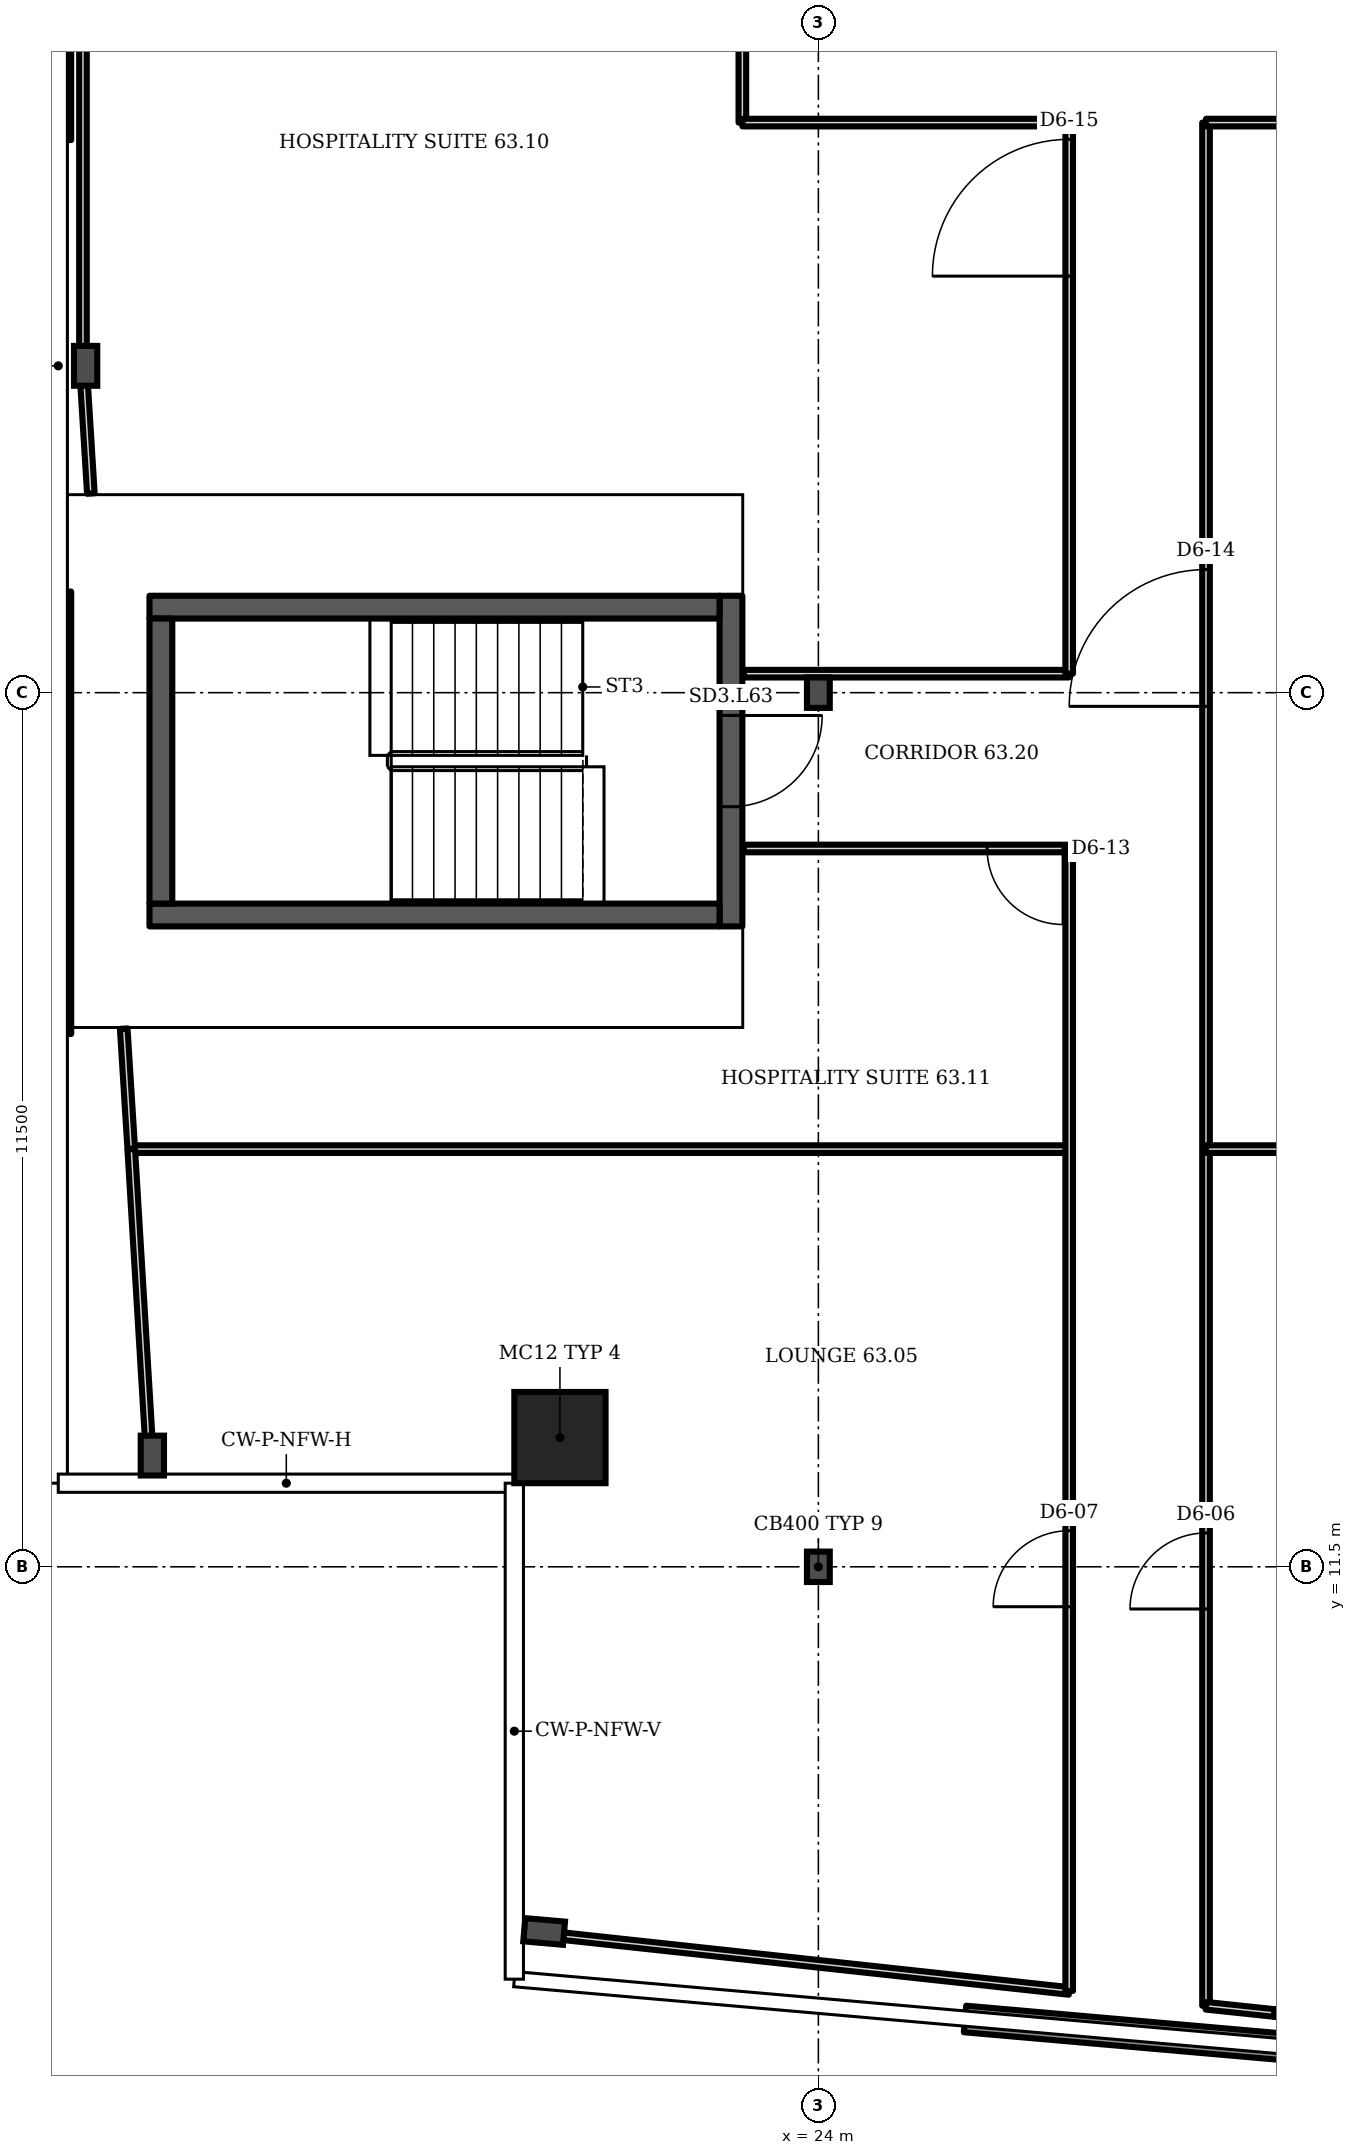
"""IFC4 building model, lengths in metres.
Left out: names, types, materials, properties, quantities, classifications, styles, units other than length and angle.
Written with IfcOpenShell. Run it as: python <this file> out.ifc"""

import sys

from ifc_helpers import new_model, si_unit, direction, frame, frame_2d, origin, origin_2d, place, context, subcontext, project, spatial, rectangle, i_section, extrude, element, fill, save


model = new_model("IFC4")
c1 = context("Model", 3, precision=1e-05, world=origin(), true_north=direction((0.0, 1.0)))
c2 = subcontext(c1, "Body", "Model", "MODEL_VIEW")
j1 = project(units=[si_unit("LENGTHUNIT", "METRE"), si_unit("PLANEANGLEUNIT", "RADIAN")], contexts=[c1])
p1 = place(None, origin())
s1 = spatial("IfcSite", under=j1, at=p1, CompositionType="ELEMENT")
p2 = place(p1, origin())
s2 = spatial("IfcBuilding", under=s1, at=p2, CompositionType="ELEMENT")
p3 = place(p2, frame((0.0, 0.0, 250.3)))
s3 = spatial("IfcBuildingStorey", under=s2, at=p3, CompositionType="ELEMENT", Elevation=250.3)
p4 = place(p3, frame((20.6, 13.2, 0.0), z_axis=(0.0, 0.0, 1.0), x_axis=(1.0, 0.0, 0.0)))
e1 = element("IfcColumn", 1, at=p4, inside=s3, PredefinedType="COLUMN", context=c2, shape_type="SweptSolid", body=[
    extrude(rectangle(XDim=1.2, YDim=1.2, at=origin_2d()), origin(), (0.0, 0.0, 1.0), 3.6),
])
for number, where, z_axis, x_axis in (
    (2, (20.392, 6.703, 0.0), (0.0, 0.0, 1.0), (-0.087, -0.996, 0.0)),
    (3, (14.36, 27.3, 0.0), (0.0, 0.0, 1.0), (-1.0, 0.0, 0.0)),
    (4, (15.238, 12.963, 0.0), (0.0, 0.0, 1.0), (-1.0, 0.0, 0.0)),
):
    element("IfcColumn", number, at=place(p3, frame(where, z_axis=z_axis, x_axis=x_axis)), inside=s3, PredefinedType="COLUMN", context=c2, shape_type="SweptSolid", body=[
        extrude(i_section(OverallWidth=0.306, OverallDepth=0.524, WebThickness=0.021, FlangeThickness=0.04, FilletRadius=0.027, at=origin_2d()), origin(), (0.0, 0.0, 1.0), 3.6),
    ])
for number, where, z_axis, x_axis in (
    (5, (24.0, 11.5, 0.0), (0.0, 0.0, 1.0), (1.0, 0.0, 0.0)),
    (6, (24.0, 23.0, 0.0), (0.0, 0.0, 1.0), (1.0, 0.0, 0.0)),
):
    element("IfcColumn", number, at=place(p3, frame(where, z_axis=z_axis, x_axis=x_axis)), inside=s3, PredefinedType="COLUMN", context=c2, shape_type="SweptSolid", body=[
        extrude(i_section(OverallWidth=0.3, OverallDepth=0.4, WebThickness=0.013, FlangeThickness=0.024, FilletRadius=0.027, at=origin_2d()), origin(), (0.0, 0.0, 1.0), 3.6),
    ])
p5 = place(p3, frame((25.929, 5.551, 0.0), z_axis=(0.0, 0.0, 1.0), x_axis=(0.996198, -0.08716, 0.0)))
e7 = element("IfcWall", 7, at=p5, inside=s3, PredefinedType="SOLIDWALL", context=c2, shape_type="SweptSolid", body=[
    extrude(rectangle(XDim=5.863, YDim=0.35, at=frame_2d((2.931, 0.0))), origin(), (0.0, 0.0, 1.0), 1.0),
])
for number, where, z_axis, x_axis in (
    (8, (13.995, 36.09, 0.0), (0.0, 0.0, 1.0), (0.0, -1.0, 0.0)),
    (9, (13.995, 24.33, 0.0), (0.0, 0.0, 1.0), (0.0, -1.0, 0.0)),
):
    element("IfcWall", number, at=place(p3, frame(where, z_axis=z_axis, x_axis=x_axis)), inside=s3, PredefinedType="SOLIDWALL", context=c2, shape_type="SweptSolid", body=[
        extrude(rectangle(XDim=5.82, YDim=0.35, at=frame_2d((2.91, 0.0))), origin(), (0.0, 0.0, 1.0), 1.0),
    ])
p6 = place(p3, frame((22.85, 19.925, 0.0), z_axis=(0.0, 0.0, 1.0), x_axis=(0.0, 1.0, 0.0)))
e10 = element("IfcWall", 10, at=p6, inside=s3, PredefinedType="SHEAR", context=c2, shape_type="SweptSolid", body=[
    extrude(rectangle(XDim=4.35, YDim=0.3, at=frame_2d((2.175, 0.0))), origin(), (0.0, 0.0, 1.0), 3.2),
])
p7 = place(p6, frame((1.575, 0.0, 0.0)))
e11 = element("IfcOpeningElement", 11, at=p7, cuts=e10, PredefinedType="OPENING", context=c2, shape_type="SweptSolid", body=[
    extrude(rectangle(XDim=1.2, YDim=2.1, at=frame_2d((0.6, 1.05))), frame((0.0, 0.16, 0.0), z_axis=(0.0, -1.0, 0.0), x_axis=(1.0, 0.0, 0.0)), (0.0, 0.0, 1.0), 0.32),
])
p8 = place(p3, frame((14.325, 27.3, 0.0), z_axis=(0.0, 0.0, 1.0), x_axis=(0.0, 1.0, 0.0)))
e12 = element("IfcWall", 12, at=p8, inside=s3, PredefinedType="PARTITIONING", context=c2, shape_type="SweptSolid", body=[
    extrude(rectangle(XDim=14.68, YDim=0.1, at=frame_2d((7.34, 0.0))), origin(), (0.0, 0.0, 1.0), 2.58),
])
p9 = place(p3, frame((14.429, 25.62, 0.0), z_axis=(0.0, 0.0, 1.0), x_axis=(-0.061647, 0.998101, 0.0)))
e13 = element("IfcWall", 13, at=p9, inside=s3, PredefinedType="PARTITIONING", context=c2, shape_type="SweptSolid", body=[
    extrude(rectangle(XDim=1.683, YDim=0.1, at=frame_2d((0.842, 0.0))), origin(), (0.0, 0.0, 1.0), 3.2),
])
p10 = place(p3, frame((14.96, 16.995, 0.0), z_axis=(0.0, 0.0, 1.0), x_axis=(1.0, 0.0, 0.0)))
e14 = element("IfcWall", 14, at=p10, inside=s3, PredefinedType="PARTITIONING", context=c2, shape_type="SweptSolid", body=[
    extrude(rectangle(XDim=12.34, YDim=0.1, at=frame_2d((6.17, 0.0))), origin(), (0.0, 0.0, 1.0), 3.2),
])
p11 = place(p3, frame((14.96, 17.0, 0.0), z_axis=(0.0, 0.0, 1.0), x_axis=(-0.062301, 0.998053, 0.0)))
e15 = element("IfcWall", 15, at=p11, inside=s3, PredefinedType="PARTITIONING", context=c2, shape_type="SweptSolid", body=[
    extrude(rectangle(XDim=1.583, YDim=0.1, at=frame_2d((0.792, 0.0))), origin(), (0.0, 0.0, 1.0), 3.2),
])
p12 = place(p3, frame((15.224, 12.62, 0.0), z_axis=(0.0, 0.0, 1.0), x_axis=(-0.060214, 0.998182, 0.0)))
e16 = element("IfcWall", 16, at=p12, inside=s3, PredefinedType="PARTITIONING", context=c2, shape_type="SweptSolid", body=[
    extrude(rectangle(XDim=4.383, YDim=0.1, at=frame_2d((2.191, 0.0))), origin(), (0.0, 0.0, 1.0), 3.2),
])
p13 = place(p3, frame((23.0, 30.5, 0.0), z_axis=(0.0, 0.0, 1.0), x_axis=(0.0, 1.0, 0.0)))
e17 = element("IfcWall", 17, at=p13, inside=s3, PredefinedType="PARTITIONING", context=c2, shape_type="SweptSolid", body=[
    extrude(rectangle(XDim=3.48, YDim=0.1, at=frame_2d((1.74, 0.0))), origin(), (0.0, 0.0, 1.0), 3.2),
])
p14 = place(p3, frame((23.0, 30.5, 0.0), z_axis=(0.0, 0.0, 1.0), x_axis=(1.0, 0.0, 0.0)))
e18 = element("IfcWall", 18, at=p14, inside=s3, PredefinedType="PARTITIONING", context=c2, shape_type="SweptSolid", body=[
    extrude(rectangle(XDim=4.3, YDim=0.1, at=frame_2d((2.15, 0.0))), origin(), (0.0, 0.0, 1.0), 3.2),
])
p15 = place(p3, frame((23.02, 20.95, 0.0), z_axis=(0.0, 0.0, 1.0), x_axis=(1.0, 0.0, 0.0)))
e19 = element("IfcWall", 19, at=p15, inside=s3, PredefinedType="PARTITIONING", context=c2, shape_type="SweptSolid", body=[
    extrude(rectangle(XDim=4.28, YDim=0.1, at=frame_2d((2.14, 0.0))), origin(), (0.0, 0.0, 1.0), 3.2),
])
p16 = place(p15, frame((3.2, 0.0, 0.0)))
e20 = element("IfcOpeningElement", 20, at=p16, cuts=e19, PredefinedType="OPENING", context=c2, shape_type="SweptSolid", body=[
    extrude(rectangle(XDim=1.0, YDim=2.1, at=frame_2d((0.5, 1.05))), frame((0.0, 0.06, 0.0), z_axis=(0.0, -1.0, 0.0), x_axis=(1.0, 0.0, 0.0)), (0.0, 0.0, 1.0), 0.12),
])
p17 = place(p3, frame((23.02, 23.25, 0.0), z_axis=(0.0, 0.0, 1.0), x_axis=(1.0, 0.0, 0.0)))
e21 = element("IfcWall", 21, at=p17, inside=s3, PredefinedType="PARTITIONING", context=c2, shape_type="SweptSolid", body=[
    extrude(rectangle(XDim=4.275, YDim=0.1, at=frame_2d((2.137, 0.0))), origin(), (0.0, 0.0, 1.0), 3.2),
])
p18 = place(p3, frame((27.3, 5.92, 0.0), z_axis=(0.0, 0.0, 1.0), x_axis=(-0.994192, 0.107591, 0.0)))
e22 = element("IfcWall", 22, at=p18, inside=s3, PredefinedType="PARTITIONING", context=c2, shape_type="SweptSolid", body=[
    extrude(rectangle(XDim=7.323, YDim=0.1, at=frame_2d((3.661, 0.0))), origin(), (0.0, 0.0, 1.0), 2.58),
])
p19 = place(p3, frame((27.3, 23.25, 0.0), z_axis=(0.0, 0.0, 1.0), x_axis=(0.0, 1.0, 0.0)))
e23 = element("IfcWall", 23, at=p19, inside=s3, PredefinedType="PARTITIONING", context=c2, shape_type="SweptSolid", body=[
    extrude(rectangle(XDim=7.25, YDim=0.1, at=frame_2d((3.625, 0.0))), origin(), (0.0, 0.0, 1.0), 3.2),
])
p20 = place(p19, frame((5.23, 0.0, 0.0)))
e24 = element("IfcOpeningElement", 24, at=p20, cuts=e23, PredefinedType="OPENING", context=c2, shape_type="SweptSolid", body=[
    extrude(rectangle(XDim=1.8, YDim=2.1, at=frame_2d((0.9, 1.05))), frame((0.0, 0.06, 0.0), z_axis=(0.0, -1.0, 0.0), x_axis=(1.0, 0.0, 0.0)), (0.0, 0.0, 1.0), 0.12),
])
p21 = place(p3, frame((27.3, 5.92, 0.0), z_axis=(0.0, 0.0, 1.0), x_axis=(0.0, 1.0, 0.0)))
e25 = element("IfcWall", 25, at=p21, inside=s3, PredefinedType="PARTITIONING", context=c2, shape_type="SweptSolid", body=[
    extrude(rectangle(XDim=15.03, YDim=0.1, at=frame_2d((7.515, 0.0))), origin(), (0.0, 0.0, 1.0), 3.2),
])
p22 = place(p21, frame((5.055, 0.0, 0.0)))
e26 = element("IfcOpeningElement", 26, at=p22, cuts=e25, PredefinedType="OPENING", context=c2, shape_type="SweptSolid", body=[
    extrude(rectangle(XDim=1.0, YDim=2.1, at=frame_2d((0.5, 1.05))), frame((0.0, 0.06, 0.0), z_axis=(0.0, -1.0, 0.0), x_axis=(1.0, 0.0, 0.0)), (0.0, 0.0, 1.0), 0.12),
])
p23 = place(p3, frame((29.1, 5.725, 0.0), z_axis=(0.0, 0.0, 1.0), x_axis=(0.0, 1.0, 0.0)))
e27 = element("IfcWall", 27, at=p23, inside=s3, PredefinedType="PARTITIONING", context=c2, shape_type="SweptSolid", body=[
    extrude(rectangle(XDim=24.775, YDim=0.1, at=frame_2d((12.387, 0.0))), origin(), (0.0, 0.0, 1.0), 3.2),
])
p24 = place(p23, frame((5.22, 0.0, 0.0)))
e28 = element("IfcOpeningElement", 28, at=p24, cuts=e27, PredefinedType="OPENING", context=c2, shape_type="SweptSolid", body=[
    extrude(rectangle(XDim=1.0, YDim=2.1, at=frame_2d((0.5, 1.05))), frame((0.0, 0.06, 0.0), z_axis=(0.0, -1.0, 0.0), x_axis=(1.0, 0.0, 0.0)), (0.0, 0.0, 1.0), 0.12),
])
p25 = place(p23, frame((17.095, 0.0, 0.0)))
e29 = element("IfcOpeningElement", 29, at=p25, cuts=e27, PredefinedType="OPENING", context=c2, shape_type="SweptSolid", body=[
    extrude(rectangle(XDim=1.8, YDim=2.1, at=frame_2d((0.9, 1.05))), frame((0.0, 0.06, 0.0), z_axis=(0.0, -1.0, 0.0), x_axis=(1.0, 0.0, 0.0)), (0.0, 0.0, 1.0), 0.12),
])
p26 = place(p3, frame((29.1, 16.995, 0.0), z_axis=(0.0, 0.0, 1.0), x_axis=(1.0, 0.0, 0.0)))
e30 = element("IfcWall", 30, at=p26, inside=s3, PredefinedType="PARTITIONING", context=c2, shape_type="SweptSolid", body=[
    extrude(rectangle(XDim=11.4, YDim=0.1, at=frame_2d((5.7, 0.0))), origin(), (0.0, 0.0, 1.0), 3.2),
])
p27 = place(p3, frame((29.1, 30.5, 0.0), z_axis=(0.0, 0.0, 1.0), x_axis=(1.0, 0.0, 0.0)))
e31 = element("IfcWall", 31, at=p27, inside=s3, PredefinedType="PARTITIONING", context=c2, shape_type="SweptSolid", body=[
    extrude(rectangle(XDim=7.75, YDim=0.1, at=frame_2d((3.875, 0.0))), origin(), (0.0, 0.0, 1.0), 3.2),
])
p28 = place(p3, frame((30.0, 5.63, 0.0), z_axis=(0.0, 0.0, 1.0), x_axis=(-0.994445, 0.105218, 0.0)))
e32 = element("IfcWall", 32, at=p28, inside=s3, PredefinedType="PARTITIONING", context=c2, shape_type="SweptSolid", body=[
    extrude(rectangle(XDim=0.905, YDim=0.1, at=frame_2d((0.453, 0.0))), origin(), (0.0, 0.0, 1.0), 2.58),
])
p29 = place(p3, frame((35.275, 5.055, 0.0), z_axis=(0.0, 0.0, 1.0), x_axis=(-0.994115, 0.108356, 0.0)))
e33 = element("IfcWall", 33, at=p29, inside=s3, PredefinedType="PARTITIONING", context=c2, shape_type="SweptSolid", body=[
    extrude(rectangle(XDim=5.306, YDim=0.1, at=frame_2d((2.653, 0.0))), origin(), (0.0, 0.0, 1.0), 2.58),
])
for number, where, z_axis, x_axis in (
    (34, (15.2, 20.075, 0.0), (0.0, 0.0, 1.0), (1.0, 0.0, 0.0)),
    (35, (15.2, 24.125, 0.0), (0.0, 0.0, 1.0), (1.0, 0.0, 0.0)),
):
    element("IfcWall", number, at=place(p3, frame(where, z_axis=z_axis, x_axis=x_axis)), inside=s3, PredefinedType="SHEAR", context=c2, shape_type="SweptSolid", body=[
        extrude(rectangle(XDim=7.5, YDim=0.3, at=frame_2d((3.75, 0.0))), origin(), (0.0, 0.0, 1.0), 3.2),
    ])
p30 = place(p3, frame((15.35, 20.225, 0.0), z_axis=(0.0, 0.0, 1.0), x_axis=(0.0, 1.0, 0.0)))
e36 = element("IfcWall", 36, at=p30, inside=s3, PredefinedType="SHEAR", context=c2, shape_type="SweptSolid", body=[
    extrude(rectangle(XDim=3.75, YDim=0.3, at=frame_2d((1.875, 0.0))), origin(), (0.0, 0.0, 1.0), 3.2),
])
p31 = place(p7, origin())
e37 = element("IfcDoor", 37, at=p31, inside=s3, OperationType="SINGLE_SWING_RIGHT", PredefinedType="DOOR", context=c2, shape_type="SweptSolid", body=[
    extrude(rectangle(XDim=1.2, YDim=2.1, at=frame_2d((0.6, 1.05))), frame((0.0, 0.025, 0.0), z_axis=(0.0, -1.0, 0.0), x_axis=(1.0, 0.0, 0.0)), (0.0, 0.0, 1.0), 0.05),
])
fill(e11, e37)
p32 = place(p24, origin())
e38 = element("IfcDoor", 38, at=p32, inside=s3, OperationType="SINGLE_SWING_LEFT", PredefinedType="DOOR", context=c2, shape_type="SweptSolid", body=[
    extrude(rectangle(XDim=1.0, YDim=2.1, at=frame_2d((0.5, 1.05))), frame((0.0, 0.025, 0.0), z_axis=(0.0, -1.0, 0.0), x_axis=(1.0, 0.0, 0.0)), (0.0, 0.0, 1.0), 0.05),
])
fill(e28, e38)
p33 = place(p22, origin())
e39 = element("IfcDoor", 39, at=p33, inside=s3, OperationType="SINGLE_SWING_LEFT", PredefinedType="DOOR", context=c2, shape_type="SweptSolid", body=[
    extrude(rectangle(XDim=1.0, YDim=2.1, at=frame_2d((0.5, 1.05))), frame((0.0, 0.025, 0.0), z_axis=(0.0, -1.0, 0.0), x_axis=(1.0, 0.0, 0.0)), (0.0, 0.0, 1.0), 0.05),
])
fill(e26, e39)
p34 = place(p16, origin())
e40 = element("IfcDoor", 40, at=p34, inside=s3, OperationType="SINGLE_SWING_RIGHT", PredefinedType="DOOR", context=c2, shape_type="SweptSolid", body=[
    extrude(rectangle(XDim=1.0, YDim=2.1, at=frame_2d((0.5, 1.05))), frame((0.0, 0.025, 0.0), z_axis=(0.0, -1.0, 0.0), x_axis=(1.0, 0.0, 0.0)), (0.0, 0.0, 1.0), 0.05),
])
fill(e20, e40)
p35 = place(p25, origin())
e41 = element("IfcDoor", 41, at=p35, inside=s3, OperationType="DOUBLE_DOOR_SINGLE_SWING", PredefinedType="DOOR", context=c2, shape_type="SweptSolid", body=[
    extrude(rectangle(XDim=1.8, YDim=2.1, at=frame_2d((0.9, 1.05))), frame((0.0, 0.025, 0.0), z_axis=(0.0, -1.0, 0.0), x_axis=(1.0, 0.0, 0.0)), (0.0, 0.0, 1.0), 0.05),
])
fill(e29, e41)
p36 = place(p20, origin())
e42 = element("IfcDoor", 42, at=p36, inside=s3, OperationType="DOUBLE_DOOR_SINGLE_SWING", PredefinedType="DOOR", context=c2, shape_type="SweptSolid", body=[
    extrude(rectangle(XDim=1.8, YDim=2.1, at=frame_2d((0.9, 1.05))), frame((0.0, 0.025, 0.0), z_axis=(0.0, -1.0, 0.0), x_axis=(1.0, 0.0, 0.0)), (0.0, 0.0, 1.0), 0.05),
])
fill(e24, e42)
save(model, sys.argv[1])
